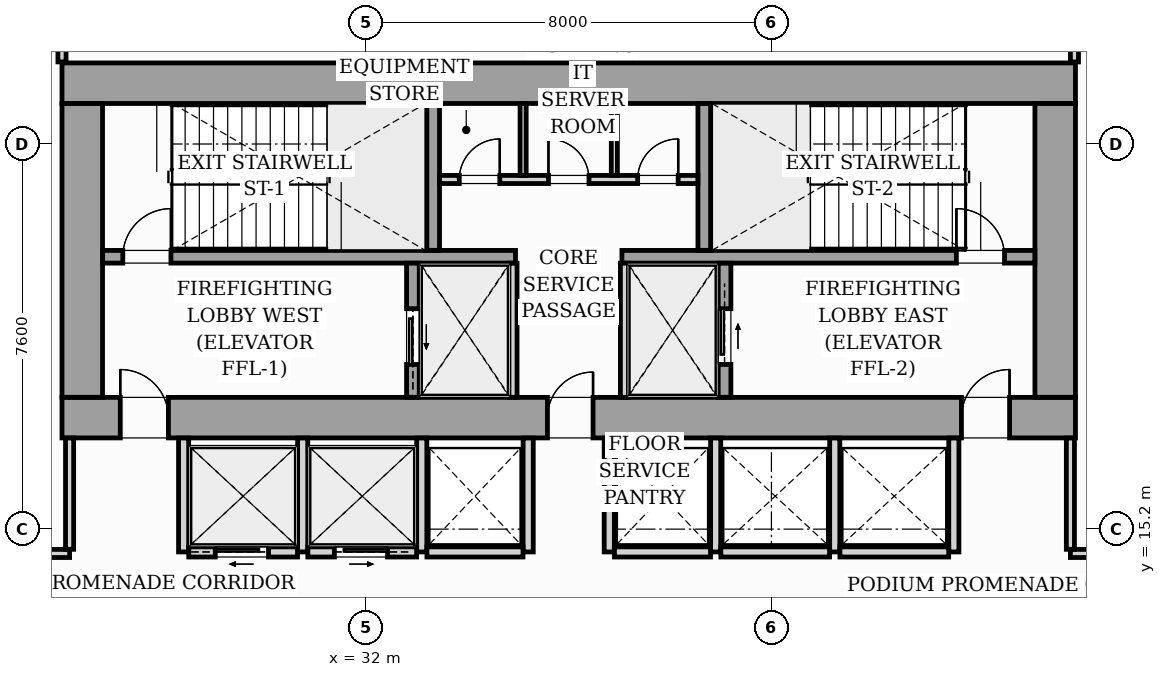
"""IFC4 building model, lengths in metres.
Left out: names, types, materials, properties, quantities, classifications, styles, units other than length and angle.
Written with IfcOpenShell. Run it as: python <this file> out.ifc"""

import sys

from ifc_helpers import new_model, si_unit, direction, frame, frame_2d, origin, origin_2d, place, context, subcontext, project, spatial, rectangle, i_section, extrude, source, transform, mapped, element, fill, save


model = new_model("IFC4")
c1 = context("Model", 3, precision=1e-05, world=origin(), true_north=direction((0.0, 1.0)))
c2 = subcontext(c1, "Body", "Model", "MODEL_VIEW")
j1 = project(units=[si_unit("LENGTHUNIT", "METRE"), si_unit("PLANEANGLEUNIT", "RADIAN")], contexts=[c1])
p1 = place(None, origin())
s1 = spatial("IfcSite", under=j1, at=p1, CompositionType="ELEMENT")
p2 = place(p1, origin())
s2 = spatial("IfcBuilding", under=s1, at=p2, CompositionType="ELEMENT")
p3 = place(p2, frame((0.0, 0.0, 14.0)))
s3 = spatial("IfcBuildingStorey", under=s2, at=p3, CompositionType="ELEMENT", Elevation=14.0)
m1 = source(origin(), c2, "Body", "SweptSolid", [
    extrude(i_section(OverallWidth=0.437, OverallDepth=0.514, WebThickness=0.061, FlangeThickness=0.097, FilletRadius=0.018, at=origin_2d()), origin(), (0.0, 0.0, 1.0), 4.496),
])
for number, where, z_axis, x_axis in (
    (1, (26.4, 17.4, 0.002), (0.0, 0.0, 1.0), (1.0, 0.0, 0.0)),
    (2, (33.12, 17.4, 0.002), (0.0, 0.0, 1.0), (1.0, 0.0, 0.0)),
    (3, (38.88, 17.4, 0.002), (0.0, 0.0, 1.0), (1.0, 0.0, 0.0)),
    (4, (45.6, 17.4, 0.002), (0.0, 0.0, 1.0), (1.0, 0.0, 0.0)),
    (5, (26.4, 24.0, 0.002), (0.0, 0.0, 1.0), (1.0, 0.0, 0.0)),
    (6, (33.12, 24.0, 0.002), (0.0, 0.0, 1.0), (1.0, 0.0, 0.0)),
    (7, (38.88, 24.0, 0.002), (0.0, 0.0, 1.0), (1.0, 0.0, 0.0)),
    (8, (45.6, 24.0, 0.002), (0.0, 0.0, 1.0), (1.0, 0.0, 0.0)),
):
    element("IfcColumn", number, at=place(p3, frame(where, z_axis=z_axis, x_axis=x_axis)), inside=s3, PredefinedType="PILASTER", context=c2, shape_type="MappedRepresentation", body=[
        mapped(m1, transform((0.0, 0.0, 0.0), scale=1.0)),
    ])
p4 = place(p3, frame((26.0, 17.4, 0.0), z_axis=(0.0, 0.0, 1.0), x_axis=(1.0, 0.0, 0.0)))
e9 = element("IfcWall", 9, at=p4, inside=s3, PredefinedType="SHEAR", context=c2, shape_type="SweptSolid", body=[
    extrude(rectangle(XDim=20.0, YDim=0.8, at=frame_2d((10.0, 0.0))), origin(), (0.0, 0.0, 1.0), 4.5),
])
p5 = place(p4, frame((1.15, 0.0, 0.0)))
e10 = element("IfcOpeningElement", 10, at=p5, cuts=e9, PredefinedType="OPENING", context=c2, shape_type="SweptSolid", body=[
    extrude(rectangle(XDim=0.95, YDim=2.06, at=frame_2d((0.475, 1.03))), frame((0.0, 0.41, 0.0), z_axis=(0.0, -1.0, 0.0), x_axis=(1.0, 0.0, 0.0)), (0.0, 0.0, 1.0), 0.82),
])
p6 = place(p4, frame((9.58, 0.0, 0.0)))
e11 = element("IfcOpeningElement", 11, at=p6, cuts=e9, PredefinedType="OPENING", context=c2, shape_type="SweptSolid", body=[
    extrude(rectangle(XDim=0.9, YDim=2.06, at=frame_2d((0.45, 1.03))), frame((0.0, 0.41, 0.0), z_axis=(0.0, -1.0, 0.0), x_axis=(1.0, 0.0, 0.0)), (0.0, 0.0, 1.0), 0.82),
])
p7 = place(p4, frame((17.75, 0.0, 0.0)))
e12 = element("IfcOpeningElement", 12, at=p7, cuts=e9, PredefinedType="OPENING", context=c2, shape_type="SweptSolid", body=[
    extrude(rectangle(XDim=0.95, YDim=2.06, at=frame_2d((0.475, 1.03))), frame((0.0, 0.41, 0.0), z_axis=(0.0, -1.0, 0.0), x_axis=(1.0, 0.0, 0.0)), (0.0, 0.0, 1.0), 0.82),
])
p8 = place(p3, frame((26.0, 24.0, 0.0), z_axis=(0.0, 0.0, 1.0), x_axis=(1.0, 0.0, 0.0)))
e13 = element("IfcWall", 13, at=p8, inside=s3, PredefinedType="SHEAR", context=c2, shape_type="SweptSolid", body=[
    extrude(rectangle(XDim=20.0, YDim=0.8, at=frame_2d((10.0, 0.0))), origin(), (0.0, 0.0, 1.0), 4.5),
])
for number, where, z_axis, x_axis in (
    (14, (26.4, 17.802, 0.0), (0.0, 0.0, 1.0), (0.0, 1.0, 0.0)),
    (15, (45.6, 17.802, 0.0), (0.0, 0.0, 1.0), (0.0, 1.0, 0.0)),
):
    element("IfcWall", number, at=place(p3, frame(where, z_axis=z_axis, x_axis=x_axis)), inside=s3, PredefinedType="SHEAR", context=c2, shape_type="SweptSolid", body=[
        extrude(rectangle(XDim=5.796, YDim=0.8, at=frame_2d((2.898, 0.0))), origin(), (0.0, 0.0, 1.0), 4.5),
    ])
p9 = place(p3, frame((26.802, 20.575, 0.0), z_axis=(0.0, 0.0, 1.0), x_axis=(1.0, 0.0, 0.0)))
e16 = element("IfcWall", 16, at=p9, inside=s3, PredefinedType="SOLIDWALL", context=c2, shape_type="SweptSolid", body=[
    extrude(rectangle(XDim=8.148, YDim=0.25, at=frame_2d((4.074, 0.0))), origin(), (0.0, 0.0, 1.0), 4.5),
])
p10 = place(p9, frame((0.398, 0.0, 0.0)))
e17 = element("IfcOpeningElement", 17, at=p10, cuts=e16, PredefinedType="OPENING", context=c2, shape_type="SweptSolid", body=[
    extrude(rectangle(XDim=0.95, YDim=2.06, at=frame_2d((0.475, 1.03))), frame((0.0, 0.135, 0.0), z_axis=(0.0, -1.0, 0.0), x_axis=(1.0, 0.0, 0.0)), (0.0, 0.0, 1.0), 0.27),
])
p11 = place(p3, frame((37.05, 20.575, 0.0), z_axis=(0.0, 0.0, 1.0), x_axis=(1.0, 0.0, 0.0)))
e18 = element("IfcWall", 18, at=p11, inside=s3, PredefinedType="SOLIDWALL", context=c2, shape_type="SweptSolid", body=[
    extrude(rectangle(XDim=8.148, YDim=0.25, at=frame_2d((4.074, 0.0))), origin(), (0.0, 0.0, 1.0), 4.5),
])
p12 = place(p11, frame((6.6, 0.0, 0.0)))
e19 = element("IfcOpeningElement", 19, at=p12, cuts=e18, PredefinedType="OPENING", context=c2, shape_type="SweptSolid", body=[
    extrude(rectangle(XDim=0.95, YDim=2.06, at=frame_2d((0.475, 1.03))), frame((0.0, 0.135, 0.0), z_axis=(0.0, -1.0, 0.0), x_axis=(1.0, 0.0, 0.0)), (0.0, 0.0, 1.0), 0.27),
])
for number, where, z_axis, x_axis in (
    (20, (33.325, 20.702, 0.0), (0.0, 0.0, 1.0), (0.0, 1.0, 0.0)),
    (21, (38.675, 20.702, 0.0), (0.0, 0.0, 1.0), (0.0, 1.0, 0.0)),
):
    element("IfcWall", number, at=place(p3, frame(where, z_axis=z_axis, x_axis=x_axis)), inside=s3, PredefinedType="SOLIDWALL", context=c2, shape_type="SweptSolid", body=[
        extrude(rectangle(XDim=2.896, YDim=0.25, at=frame_2d((1.448, 0.0))), origin(), (0.0, 0.0, 1.0), 4.5),
    ])
p13 = place(p3, frame((32.925, 17.802, 0.0), z_axis=(0.0, 0.0, 1.0), x_axis=(0.0, 1.0, 0.0)))
e22 = element("IfcWall", 22, at=p13, inside=s3, PredefinedType="SOLIDWALL", context=c2, shape_type="SweptSolid", body=[
    extrude(rectangle(XDim=2.646, YDim=0.25, at=frame_2d((1.323, 0.0))), origin(), (0.0, 0.0, 1.0), 4.5),
])
p14 = place(p13, frame((0.648, 0.0, 0.0)))
e23 = element("IfcOpeningElement", 23, at=p14, cuts=e22, PredefinedType="OPENING", context=c2, shape_type="SweptSolid", body=[
    extrude(rectangle(XDim=1.1, YDim=2.08, at=frame_2d((0.55, 1.04))), frame((0.0, 0.135, 0.0), z_axis=(0.0, -1.0, 0.0), x_axis=(1.0, 0.0, 0.0)), (0.0, 0.0, 1.0), 0.27),
])
for number, where, z_axis, x_axis in (
    (24, (34.9, 17.802, 0.0), (0.0, 0.0, 1.0), (0.0, 1.0, 0.0)),
    (25, (37.1, 17.802, 0.0), (0.0, 0.0, 1.0), (0.0, 1.0, 0.0)),
):
    element("IfcWall", number, at=place(p3, frame(where, z_axis=z_axis, x_axis=x_axis)), inside=s3, PredefinedType="PARTITIONING", context=c2, shape_type="SweptSolid", body=[
        extrude(rectangle(XDim=2.646, YDim=0.16, at=frame_2d((1.323, 0.0))), origin(), (0.0, 0.0, 1.0), 4.08),
    ])
p15 = place(p3, frame((39.075, 17.802, 0.0), z_axis=(0.0, 0.0, 1.0), x_axis=(0.0, 1.0, 0.0)))
e26 = element("IfcWall", 26, at=p15, inside=s3, PredefinedType="SOLIDWALL", context=c2, shape_type="SweptSolid", body=[
    extrude(rectangle(XDim=2.646, YDim=0.25, at=frame_2d((1.323, 0.0))), origin(), (0.0, 0.0, 1.0), 4.5),
])
p16 = place(p15, frame((0.648, 0.0, 0.0)))
e27 = element("IfcOpeningElement", 27, at=p16, cuts=e26, PredefinedType="OPENING", context=c2, shape_type="SweptSolid", body=[
    extrude(rectangle(XDim=1.1, YDim=2.08, at=frame_2d((0.55, 1.04))), frame((0.0, 0.135, 0.0), z_axis=(0.0, -1.0, 0.0), x_axis=(1.0, 0.0, 0.0)), (0.0, 0.0, 1.0), 0.27),
])
p17 = place(p3, frame((33.452, 22.1, 0.0), z_axis=(0.0, 0.0, 1.0), x_axis=(1.0, 0.0, 0.0)))
e28 = element("IfcWall", 28, at=p17, inside=s3, PredefinedType="PARTITIONING", context=c2, shape_type="SweptSolid", body=[
    extrude(rectangle(XDim=5.096, YDim=0.16, at=frame_2d((2.548, 0.0))), origin(), (0.0, 0.0, 1.0), 4.08),
])
p18 = place(p17, frame((0.388, 0.0, 0.0)))
e29 = element("IfcOpeningElement", 29, at=p18, cuts=e28, PredefinedType="OPENING", context=c2, shape_type="SweptSolid", body=[
    extrude(rectangle(XDim=0.8, YDim=2.05, at=frame_2d((0.4, 1.025))), frame((0.0, 0.09, 0.0), z_axis=(0.0, -1.0, 0.0), x_axis=(1.0, 0.0, 0.0)), (0.0, 0.0, 1.0), 0.18),
])
p19 = place(p17, frame((2.148, 0.0, 0.0)))
e30 = element("IfcOpeningElement", 30, at=p19, cuts=e28, PredefinedType="OPENING", context=c2, shape_type="SweptSolid", body=[
    extrude(rectangle(XDim=0.8, YDim=2.05, at=frame_2d((0.4, 1.025))), frame((0.0, 0.09, 0.0), z_axis=(0.0, -1.0, 0.0), x_axis=(1.0, 0.0, 0.0)), (0.0, 0.0, 1.0), 0.18),
])
p20 = place(p17, frame((3.908, 0.0, 0.0)))
e31 = element("IfcOpeningElement", 31, at=p20, cuts=e28, PredefinedType="OPENING", context=c2, shape_type="SweptSolid", body=[
    extrude(rectangle(XDim=0.8, YDim=2.05, at=frame_2d((0.4, 1.025))), frame((0.0, 0.09, 0.0), z_axis=(0.0, -1.0, 0.0), x_axis=(1.0, 0.0, 0.0)), (0.0, 0.0, 1.0), 0.18),
])
for number, where, z_axis, x_axis in (
    (32, (35.1, 22.182, 0.0), (0.0, 0.0, 1.0), (0.0, 1.0, 0.0)),
    (33, (36.9, 22.182, 0.0), (0.0, 0.0, 1.0), (0.0, 1.0, 0.0)),
):
    element("IfcWall", number, at=place(p3, frame(where, z_axis=z_axis, x_axis=x_axis)), inside=s3, PredefinedType="PARTITIONING", context=c2, shape_type="SweptSolid", body=[
        extrude(rectangle(XDim=1.416, YDim=0.12, at=frame_2d((0.708, 0.0))), origin(), (0.0, 0.0, 1.0), 4.08),
    ])
for number, where, z_axis, x_axis in (
    (34, (28.4, 14.75, 0.0), (0.0, 0.0, 1.0), (0.0, 1.0, 0.0)),
    (35, (30.75, 14.75, 0.0), (0.0, 0.0, 1.0), (0.0, 1.0, 0.0)),
    (36, (33.1, 14.75, 0.0), (0.0, 0.0, 1.0), (0.0, 1.0, 0.0)),
):
    element("IfcWall", number, at=place(p3, frame(where, z_axis=z_axis, x_axis=x_axis)), inside=s3, PredefinedType="PARTITIONING", context=c2, shape_type="SweptSolid", body=[
        extrude(rectangle(XDim=2.248, YDim=0.2, at=frame_2d((1.124, 0.0))), origin(), (0.0, 0.0, 1.0), 4.08),
    ])
p21 = place(p3, frame((28.502, 14.75, 0.0), z_axis=(0.0, 0.0, 1.0), x_axis=(1.0, 0.0, 0.0)))
e37 = element("IfcWall", 37, at=p21, inside=s3, PredefinedType="PARTITIONING", context=c2, shape_type="SweptSolid", body=[
    extrude(rectangle(XDim=2.146, YDim=0.2, at=frame_2d((1.073, 0.0))), origin(), (0.0, 0.0, 1.0), 4.08),
])
p22 = place(p21, frame((0.523, 0.0, 0.0)))
e38 = element("IfcOpeningElement", 38, at=p22, cuts=e37, PredefinedType="OPENING", context=c2, shape_type="SweptSolid", body=[
    extrude(rectangle(XDim=1.05, YDim=2.08, at=frame_2d((0.525, 1.04))), frame((0.0, 0.11, 0.0), z_axis=(0.0, -1.0, 0.0), x_axis=(1.0, 0.0, 0.0)), (0.0, 0.0, 1.0), 0.22),
])
p23 = place(p3, frame((30.852, 14.75, 0.0), z_axis=(0.0, 0.0, 1.0), x_axis=(1.0, 0.0, 0.0)))
e39 = element("IfcWall", 39, at=p23, inside=s3, PredefinedType="PARTITIONING", context=c2, shape_type="SweptSolid", body=[
    extrude(rectangle(XDim=2.146, YDim=0.2, at=frame_2d((1.073, 0.0))), origin(), (0.0, 0.0, 1.0), 4.08),
])
p24 = place(p23, frame((0.523, 0.0, 0.0)))
e40 = element("IfcOpeningElement", 40, at=p24, cuts=e39, PredefinedType="OPENING", context=c2, shape_type="SweptSolid", body=[
    extrude(rectangle(XDim=1.05, YDim=2.08, at=frame_2d((0.525, 1.04))), frame((0.0, 0.11, 0.0), z_axis=(0.0, -1.0, 0.0), x_axis=(1.0, 0.0, 0.0)), (0.0, 0.0, 1.0), 0.22),
])
p25 = place(p3, frame((35.2, 14.75, 0.0), z_axis=(0.0, 0.0, 1.0), x_axis=(0.0, 1.0, 0.0)))
e41 = element("IfcWall", 41, at=p25, inside=s3, PredefinedType="PARTITIONING", context=c2, shape_type="SweptSolid", body=[
    extrude(rectangle(XDim=2.248, YDim=0.2, at=frame_2d((1.124, 0.0))), origin(), (0.0, 0.0, 1.0), 4.08),
])
p26 = place(p3, frame((33.202, 14.75, 0.0), z_axis=(0.0, 0.0, 1.0), x_axis=(1.0, 0.0, 0.0)))
e42 = element("IfcWall", 42, at=p26, inside=s3, PredefinedType="PARTITIONING", context=c2, shape_type="SweptSolid", body=[
    extrude(rectangle(XDim=1.896, YDim=0.2, at=frame_2d((0.948, 0.0))), origin(), (0.0, 0.0, 1.0), 4.08),
])
for number, where, z_axis, x_axis in (
    (43, (36.8, 14.75, 0.0), (0.0, 0.0, 1.0), (0.0, 1.0, 0.0)),
    (44, (38.9, 14.75, 0.0), (0.0, 0.0, 1.0), (0.0, 1.0, 0.0)),
):
    element("IfcWall", number, at=place(p3, frame(where, z_axis=z_axis, x_axis=x_axis)), inside=s3, PredefinedType="PARTITIONING", context=c2, shape_type="SweptSolid", body=[
        extrude(rectangle(XDim=2.248, YDim=0.2, at=frame_2d((1.124, 0.0))), origin(), (0.0, 0.0, 1.0), 4.08),
    ])
p27 = place(p3, frame((36.902, 14.75, 0.0), z_axis=(0.0, 0.0, 1.0), x_axis=(1.0, 0.0, 0.0)))
e45 = element("IfcWall", 45, at=p27, inside=s3, PredefinedType="PARTITIONING", context=c2, shape_type="SweptSolid", body=[
    extrude(rectangle(XDim=1.896, YDim=0.2, at=frame_2d((0.948, 0.0))), origin(), (0.0, 0.0, 1.0), 4.08),
])
for number, where, z_axis, x_axis in (
    (46, (41.25, 14.75, 0.0), (0.0, 0.0, 1.0), (0.0, 1.0, 0.0)),
    (47, (43.6, 14.75, 0.0), (0.0, 0.0, 1.0), (0.0, 1.0, 0.0)),
):
    element("IfcWall", number, at=place(p3, frame(where, z_axis=z_axis, x_axis=x_axis)), inside=s3, PredefinedType="PARTITIONING", context=c2, shape_type="SweptSolid", body=[
        extrude(rectangle(XDim=2.248, YDim=0.2, at=frame_2d((1.124, 0.0))), origin(), (0.0, 0.0, 1.0), 4.08),
    ])
for number, where, z_axis, x_axis in (
    (48, (39.002, 14.75, 0.0), (0.0, 0.0, 1.0), (1.0, 0.0, 0.0)),
    (49, (41.352, 14.75, 0.0), (0.0, 0.0, 1.0), (1.0, 0.0, 0.0)),
):
    element("IfcWall", number, at=place(p3, frame(where, z_axis=z_axis, x_axis=x_axis)), inside=s3, PredefinedType="PARTITIONING", context=c2, shape_type="SweptSolid", body=[
        extrude(rectangle(XDim=2.146, YDim=0.2, at=frame_2d((1.073, 0.0))), origin(), (0.0, 0.0, 1.0), 4.08),
    ])
p28 = place(p3, frame((3.65, 14.72, 0.0), z_axis=(0.0, 0.0, 1.0), x_axis=(1.0, 0.0, 0.0)))
e50 = element("IfcWall", 50, at=p28, inside=s3, PredefinedType="PARTITIONING", context=c2, shape_type="SweptSolid", body=[
    extrude(rectangle(XDim=22.5, YDim=0.16, at=frame_2d((11.25, 0.0))), origin(), (0.0, 0.0, 1.0), 4.08),
])
p29 = place(p28, frame((16.5, 0.0, 0.0)))
e51 = element("IfcOpeningElement", 51, at=p29, cuts=e50, PredefinedType="OPENING", context=c2, shape_type="SweptSolid", body=[
    extrude(rectangle(XDim=0.95, YDim=2.06, at=frame_2d((0.475, 1.03))), frame((0.0, 0.09, 0.0), z_axis=(0.0, -1.0, 0.0), x_axis=(1.0, 0.0, 0.0)), (0.0, 0.0, 1.0), 0.18),
])
p30 = place(p28, frame((3.6, 0.0, 0.0)))
e52 = element("IfcOpeningElement", 52, at=p30, cuts=e50, PredefinedType="OPENING", context=c2, shape_type="SweptSolid", body=[
    extrude(rectangle(XDim=0.9, YDim=2.05, at=frame_2d((0.45, 1.025))), frame((0.0, 0.09, 0.0), z_axis=(0.0, -1.0, 0.0), x_axis=(1.0, 0.0, 0.0)), (0.0, 0.0, 1.0), 0.18),
])
p31 = place(p28, frame((6.8, 0.0, 0.0)))
e53 = element("IfcOpeningElement", 53, at=p31, cuts=e50, PredefinedType="OPENING", context=c2, shape_type="SweptSolid", body=[
    extrude(rectangle(XDim=0.9, YDim=2.05, at=frame_2d((0.45, 1.025))), frame((0.0, 0.09, 0.0), z_axis=(0.0, -1.0, 0.0), x_axis=(1.0, 0.0, 0.0)), (0.0, 0.0, 1.0), 0.18),
])
p32 = place(p28, frame((11.8, 0.0, 0.0)))
e54 = element("IfcOpeningElement", 54, at=p32, cuts=e50, PredefinedType="OPENING", context=c2, shape_type="SweptSolid", body=[
    extrude(rectangle(XDim=0.95, YDim=2.1, at=frame_2d((0.475, 1.05))), frame((0.0, 0.09, 0.0), z_axis=(0.0, -1.0, 0.0), x_axis=(1.0, 0.0, 0.0)), (0.0, 0.0, 1.0), 0.18),
])
p33 = place(p3, frame((45.9, 14.72, 0.0), z_axis=(0.0, 0.0, 1.0), x_axis=(1.0, 0.0, 0.0)))
e55 = element("IfcWall", 55, at=p33, inside=s3, PredefinedType="PARTITIONING", context=c2, shape_type="SweptSolid", body=[
    extrude(rectangle(XDim=25.398, YDim=0.16, at=frame_2d((12.699, 0.0))), origin(), (0.0, 0.0, 1.0), 4.08),
])
p34 = place(p33, frame((5.0, 0.0, 0.0)))
e56 = element("IfcOpeningElement", 56, at=p34, cuts=e55, PredefinedType="OPENING", context=c2, shape_type="SweptSolid", body=[
    extrude(rectangle(XDim=1.4, YDim=2.08, at=frame_2d((0.7, 1.04))), frame((0.0, 0.09, 0.0), z_axis=(0.0, -1.0, 0.0), x_axis=(1.0, 0.0, 0.0)), (0.0, 0.0, 1.0), 0.18),
])
for number, where, z_axis, x_axis in (
    (57, (26.0, 24.42, 0.0), (0.0, 0.0, 1.0), (0.0, 1.0, 0.0)),
    (58, (45.98, 24.42, 0.0), (0.0, 0.0, 1.0), (0.0, 1.0, 0.0)),
):
    element("IfcWall", number, at=place(p3, frame(where, z_axis=z_axis, x_axis=x_axis)), inside=s3, PredefinedType="PARTITIONING", context=c2, shape_type="SweptSolid", body=[
        extrude(rectangle(XDim=8.43, YDim=0.16, at=frame_2d((4.215, 0.0))), origin(), (0.0, 0.0, 1.0), 4.08),
    ])
for number, where, z_axis, x_axis in (
    (59, (26.15, 14.802, 0.0), (0.0, 0.0, 1.0), (0.0, 1.0, 0.0)),
    (60, (45.9, 14.802, 0.0), (0.0, 0.0, 1.0), (0.0, 1.0, 0.0)),
):
    element("IfcWall", number, at=place(p3, frame(where, z_axis=z_axis, x_axis=x_axis)), inside=s3, PredefinedType="PARTITIONING", context=c2, shape_type="SweptSolid", body=[
        extrude(rectangle(XDim=2.196, YDim=0.16, at=frame_2d((1.098, 0.0))), origin(), (0.0, 0.0, 1.0), 4.08),
    ])
m2 = source(origin(), c2, "Body", "SweptSolid", [
    extrude(rectangle(XDim=0.95, YDim=2.06, at=frame_2d((0.475, 1.03))), frame((0.0, 0.025, 0.0), z_axis=(0.0, -1.0, 0.0), x_axis=(1.0, 0.0, 0.0)), (0.0, 0.0, 1.0), 0.05),
])
p35 = place(p5, origin())
e61 = element("IfcDoor", 61, at=p35, inside=s3, OperationType="SINGLE_SWING_LEFT", PredefinedType="DOOR", context=c2, shape_type="MappedRepresentation", body=[
    mapped(m2, transform((0.0, 0.0, 0.0), scale=1.0)),
])
fill(e10, e61)
m3 = source(origin(), c2, "Body", "SweptSolid", [
    extrude(rectangle(XDim=0.9, YDim=2.06, at=frame_2d((0.45, 1.03))), frame((0.0, 0.025, 0.0), z_axis=(0.0, -1.0, 0.0), x_axis=(1.0, 0.0, 0.0)), (0.0, 0.0, 1.0), 0.05),
])
p36 = place(p6, origin())
e62 = element("IfcDoor", 62, at=p36, inside=s3, OperationType="SINGLE_SWING_RIGHT", PredefinedType="DOOR", context=c2, shape_type="MappedRepresentation", body=[
    mapped(m3, transform((0.0, 0.0, 0.0), scale=1.0)),
])
fill(e11, e62)
p37 = place(p7, origin())
e63 = element("IfcDoor", 63, at=p37, inside=s3, OperationType="SINGLE_SWING_RIGHT", PredefinedType="DOOR", context=c2, shape_type="MappedRepresentation", body=[
    mapped(m2, transform((0.0, 0.0, 0.0), scale=1.0)),
])
fill(e12, e63)
p38 = place(p10, origin())
e64 = element("IfcDoor", 64, at=p38, inside=s3, OperationType="SINGLE_SWING_RIGHT", PredefinedType="DOOR", context=c2, shape_type="MappedRepresentation", body=[
    mapped(m2, transform((0.0, 0.0, 0.0), scale=1.0)),
])
fill(e17, e64)
p39 = place(p12, origin())
e65 = element("IfcDoor", 65, at=p39, inside=s3, OperationType="SINGLE_SWING_LEFT", PredefinedType="DOOR", context=c2, shape_type="MappedRepresentation", body=[
    mapped(m2, transform((0.0, 0.0, 0.0), scale=1.0)),
])
fill(e19, e65)
m4 = source(origin(), c2, "Body", "SweptSolid", [
    extrude(rectangle(XDim=1.1, YDim=2.08, at=frame_2d((0.55, 1.04))), frame((0.0, 0.025, 0.0), z_axis=(0.0, -1.0, 0.0), x_axis=(1.0, 0.0, 0.0)), (0.0, 0.0, 1.0), 0.05),
])
p40 = place(p14, origin())
e66 = element("IfcDoor", 66, at=p40, inside=s3, OperationType="SLIDING_TO_LEFT", PredefinedType="DOOR", context=c2, shape_type="MappedRepresentation", body=[
    mapped(m4, transform((0.0, 0.0, 0.0), scale=1.0)),
])
fill(e23, e66)
p41 = place(p16, origin())
e67 = element("IfcDoor", 67, at=p41, inside=s3, OperationType="SLIDING_TO_RIGHT", PredefinedType="DOOR", context=c2, shape_type="MappedRepresentation", body=[
    mapped(m4, transform((0.0, 0.0, 0.0), scale=1.0)),
])
fill(e27, e67)
m5 = source(origin(), c2, "Body", "SweptSolid", [
    extrude(rectangle(XDim=0.8, YDim=2.05, at=frame_2d((0.4, 1.025))), frame((0.0, 0.025, 0.0), z_axis=(0.0, -1.0, 0.0), x_axis=(1.0, 0.0, 0.0)), (0.0, 0.0, 1.0), 0.05),
])
p42 = place(p18, origin())
e68 = element("IfcDoor", 68, at=p42, inside=s3, OperationType="SINGLE_SWING_RIGHT", PredefinedType="DOOR", context=c2, shape_type="MappedRepresentation", body=[
    mapped(m5, transform((0.0, 0.0, 0.0), scale=1.0)),
])
fill(e29, e68)
p43 = place(p19, origin())
e69 = element("IfcDoor", 69, at=p43, inside=s3, OperationType="SINGLE_SWING_LEFT", PredefinedType="DOOR", context=c2, shape_type="MappedRepresentation", body=[
    mapped(m5, transform((0.0, 0.0, 0.0), scale=1.0)),
])
fill(e30, e69)
p44 = place(p20, origin())
e70 = element("IfcDoor", 70, at=p44, inside=s3, OperationType="SINGLE_SWING_RIGHT", PredefinedType="DOOR", context=c2, shape_type="MappedRepresentation", body=[
    mapped(m5, transform((0.0, 0.0, 0.0), scale=1.0)),
])
fill(e31, e70)
m6 = source(origin(), c2, "Body", "SweptSolid", [
    extrude(rectangle(XDim=1.05, YDim=2.08, at=frame_2d((0.525, 1.04))), frame((0.0, 0.025, 0.0), z_axis=(0.0, -1.0, 0.0), x_axis=(1.0, 0.0, 0.0)), (0.0, 0.0, 1.0), 0.05),
])
p45 = place(p22, origin())
e71 = element("IfcDoor", 71, at=p45, inside=s3, OperationType="SLIDING_TO_LEFT", PredefinedType="DOOR", context=c2, shape_type="MappedRepresentation", body=[
    mapped(m6, transform((0.0, 0.0, 0.0), scale=1.0)),
])
fill(e38, e71)
p46 = place(p24, origin())
e72 = element("IfcDoor", 72, at=p46, inside=s3, OperationType="SLIDING_TO_RIGHT", PredefinedType="DOOR", context=c2, shape_type="MappedRepresentation", body=[
    mapped(m6, transform((0.0, 0.0, 0.0), scale=1.0)),
])
fill(e40, e72)
save(model, sys.argv[1])
